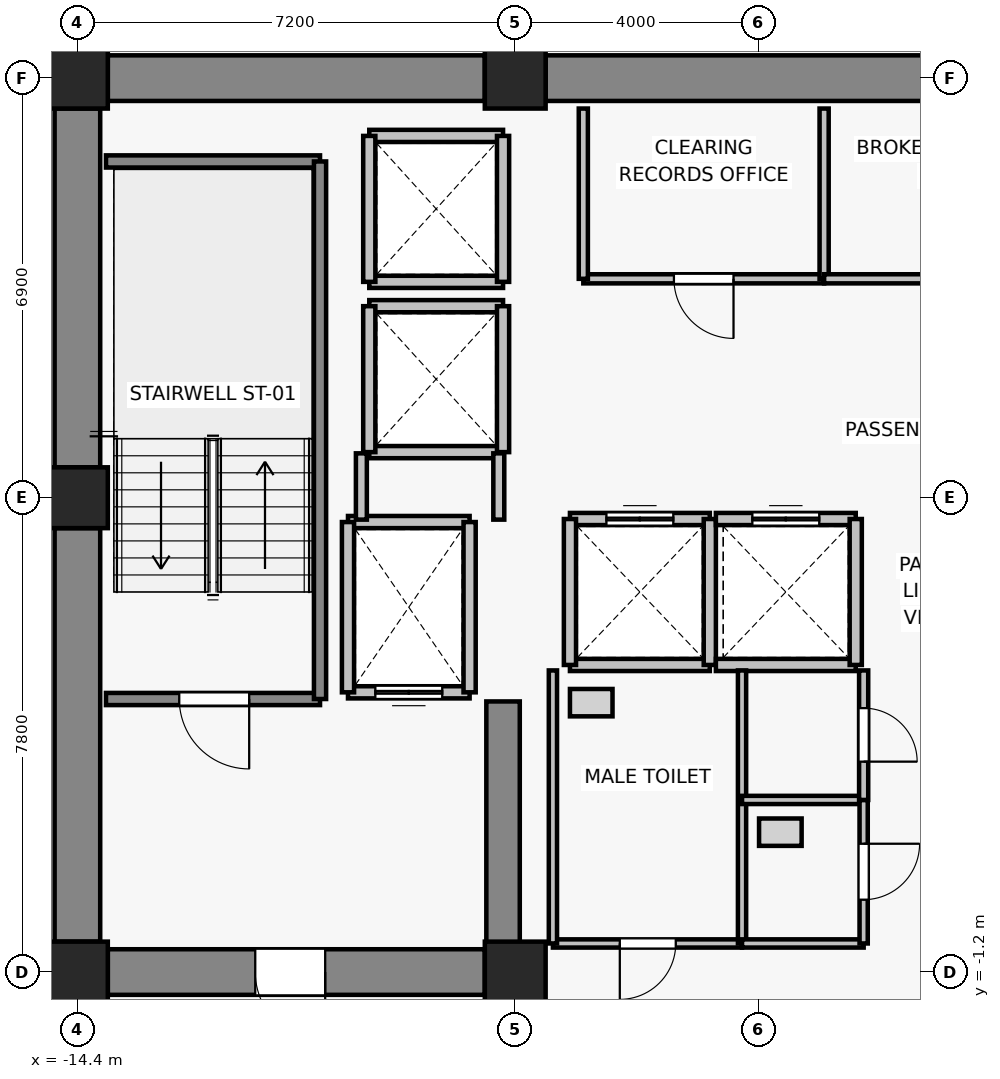
"""IFC4 building model, lengths in metres.
Left out: names, types, materials, properties, quantities, classifications, styles, units other than length and angle.
Written with IfcOpenShell. Run it as: python <this file> out.ifc"""

import sys

from ifc_helpers import new_model, si_unit, direction, frame, frame_2d, origin, origin_2d, place, context, subcontext, project, spatial, rectangle, extrude, source, transform, mapped, element, fill, save


model = new_model("IFC4")
c1 = context("Model", 3, precision=1e-05, world=origin(), true_north=direction((0.0, 1.0)))
c2 = subcontext(c1, "Body", "Model", "MODEL_VIEW")
j1 = project(units=[si_unit("LENGTHUNIT", "METRE"), si_unit("PLANEANGLEUNIT", "RADIAN")], contexts=[c1])
p1 = place(None, origin())
s1 = spatial("IfcSite", under=j1, at=p1, CompositionType="ELEMENT")
p2 = place(p1, origin())
s2 = spatial("IfcBuilding", under=s1, at=p2, CompositionType="ELEMENT")
p3 = place(p2, frame((0.0, 0.0, 116.5)))
s3 = spatial("IfcBuildingStorey", under=s2, at=p3, CompositionType="ELEMENT", Elevation=116.5)
for number, where, z_axis, x_axis in (
    (1, (-14.4, -1.2, 0.0), (0.0, 0.0, 1.0), (1.0, 0.0, 0.0)),
    (2, (-7.2, -1.2, 0.0), (0.0, 0.0, 1.0), (1.0, 0.0, 0.0)),
    (3, (-14.4, 6.6, 0.0), (0.0, 0.0, 1.0), (1.0, 0.0, 0.0)),
    (4, (-14.4, 13.5, 0.0), (0.0, 0.0, 1.0), (1.0, 0.0, 0.0)),
    (5, (-7.2, 13.5, 0.0), (0.0, 0.0, 1.0), (1.0, 0.0, 0.0)),
):
    element("IfcColumn", number, at=place(p3, frame(where, z_axis=z_axis, x_axis=x_axis)), inside=s3, PredefinedType="COLUMN", context=c2, shape_type="SweptSolid", body=[
        extrude(rectangle(XDim=1.0, YDim=1.0, at=origin_2d()), origin(), (0.0, 0.0, 1.0), 3.3),
    ])
p4 = place(p3, frame((-13.9, 13.5, 0.0), z_axis=(0.0, 0.0, 1.0), x_axis=(1.0, 0.0, 0.0)))
e6 = element("IfcWall", 6, at=p4, inside=s3, PredefinedType="SHEAR", context=c2, shape_type="SweptSolid", body=[
    extrude(rectangle(XDim=6.2, YDim=0.75, at=frame_2d((3.1, 0.0))), origin(), (0.0, 0.0, 1.0), 3.075),
])
p5 = place(p3, frame((-6.7, 13.5, 0.0), z_axis=(0.0, 0.0, 1.0), x_axis=(1.0, 0.0, 0.0)))
e7 = element("IfcWall", 7, at=p5, inside=s3, PredefinedType="SHEAR", context=c2, shape_type="SweptSolid", body=[
    extrude(rectangle(XDim=13.4, YDim=0.75, at=frame_2d((6.7, 0.0))), origin(), (0.0, 0.0, 1.0), 3.075),
])
p6 = place(p3, frame((-14.4, -0.7, 0.0), z_axis=(0.0, 0.0, 1.0), x_axis=(0.0, 1.0, 0.0)))
e8 = element("IfcWall", 8, at=p6, inside=s3, PredefinedType="SHEAR", context=c2, shape_type="SweptSolid", body=[
    extrude(rectangle(XDim=6.8, YDim=0.75, at=frame_2d((3.4, 0.0))), origin(), (0.0, 0.0, 1.0), 3.075),
])
p7 = place(p3, frame((-14.4, 7.1, 0.0), z_axis=(0.0, 0.0, 1.0), x_axis=(0.0, 1.0, 0.0)))
e9 = element("IfcWall", 9, at=p7, inside=s3, PredefinedType="SHEAR", context=c2, shape_type="SweptSolid", body=[
    extrude(rectangle(XDim=5.9, YDim=0.75, at=frame_2d((2.95, 0.0))), origin(), (0.0, 0.0, 1.0), 3.075),
])
p8 = place(p3, frame((-7.7, -1.2, 0.0), z_axis=(0.0, 0.0, 1.0), x_axis=(-1.0, 0.0, 0.0)))
e10 = element("IfcWall", 10, at=p8, inside=s3, PredefinedType="SHEAR", context=c2, shape_type="SweptSolid", body=[
    extrude(rectangle(XDim=6.2, YDim=0.75, at=frame_2d((3.1, 0.0))), origin(), (0.0, 0.0, 1.0), 3.075),
])
p9 = place(p8, frame((2.625, 0.0, 0.0)))
e11 = element("IfcOpeningElement", 11, at=p9, cuts=e10, PredefinedType="OPENING", context=c2, shape_type="SweptSolid", body=[
    extrude(rectangle(XDim=1.15, YDim=2.15, at=frame_2d((0.575, 1.075))), frame((0.0, 0.385, 0.0), z_axis=(0.0, -1.0, 0.0), x_axis=(1.0, 0.0, 0.0)), (0.0, 0.0, 1.0), 0.77),
])
p10 = place(p3, frame((-7.4, -0.825, 0.0), z_axis=(0.0, 0.0, 1.0), x_axis=(0.0, 1.0, 0.0)))
e12 = element("IfcWall", 12, at=p10, inside=s3, PredefinedType="SHEAR", context=c2, shape_type="SweptSolid", body=[
    extrude(rectangle(XDim=4.075, YDim=0.55, at=frame_2d((2.038, 0.0))), origin(), (0.0, 0.0, 1.0), 3.075),
])
p11 = place(p3, frame((-7.95, 3.4, 0.0), z_axis=(0.0, 0.0, 1.0), x_axis=(-1.0, 0.0, 0.0)))
e13 = element("IfcWall", 13, at=p11, inside=s3, PredefinedType="SOLIDWALL", context=c2, shape_type="SweptSolid", body=[
    extrude(rectangle(XDim=2.0, YDim=0.2, at=frame_2d((1.0, 0.0))), origin(), (0.0, 0.0, 1.0), 3.075),
])
p12 = place(p11, frame((0.45, 0.0, 0.0)))
e14 = element("IfcOpeningElement", 14, at=p12, cuts=e13, PredefinedType="OPENING", context=c2, shape_type="SweptSolid", body=[
    extrude(rectangle(XDim=1.1, YDim=2.2, at=frame_2d((0.55, 1.1))), frame((0.0, 0.11, 0.0), z_axis=(0.0, -1.0, 0.0), x_axis=(1.0, 0.0, 0.0)), (0.0, 0.0, 1.0), 0.22),
])
p13 = place(p3, frame((-9.95, 6.2, 0.0), z_axis=(0.0, 0.0, 1.0), x_axis=(1.0, 0.0, 0.0)))
e15 = element("IfcWall", 15, at=p13, inside=s3, PredefinedType="SOLIDWALL", context=c2, shape_type="SweptSolid", body=[
    extrude(rectangle(XDim=2.0, YDim=0.2, at=frame_2d((1.0, 0.0))), origin(), (0.0, 0.0, 1.0), 3.075),
])
for number, where, z_axis, x_axis in (
    (16, (-9.95, 3.4, 0.0), (0.0, 0.0, 1.0), (0.0, 1.0, 0.0)),
    (17, (-7.95, 6.2, 0.0), (0.0, 0.0, 1.0), (0.0, -1.0, 0.0)),
):
    element("IfcWall", number, at=place(p3, frame(where, z_axis=z_axis, x_axis=x_axis)), inside=s3, PredefinedType="SOLIDWALL", context=c2, shape_type="SweptSolid", body=[
        extrude(rectangle(XDim=2.8, YDim=0.2, at=frame_2d((1.4, 0.0))), origin(), (0.0, 0.0, 1.0), 3.075),
    ])
p14 = place(p3, frame((-4.0, 3.85, 0.0), z_axis=(0.0, 0.0, 1.0), x_axis=(-1.0, 0.0, 0.0)))
e18 = element("IfcWall", 18, at=p14, inside=s3, PredefinedType="SOLIDWALL", context=c2, shape_type="SweptSolid", body=[
    extrude(rectangle(XDim=2.3, YDim=0.2, at=frame_2d((1.15, 0.0))), origin(), (0.0, 0.0, 1.0), 3.075),
])
p15 = place(p3, frame((-6.3, 6.25, 0.0), z_axis=(0.0, 0.0, 1.0), x_axis=(1.0, 0.0, 0.0)))
e19 = element("IfcWall", 19, at=p15, inside=s3, PredefinedType="SOLIDWALL", context=c2, shape_type="SweptSolid", body=[
    extrude(rectangle(XDim=2.3, YDim=0.2, at=frame_2d((1.15, 0.0))), origin(), (0.0, 0.0, 1.0), 3.075),
])
p16 = place(p15, frame((0.6, 0.0, 0.0)))
e20 = element("IfcOpeningElement", 20, at=p16, cuts=e19, PredefinedType="OPENING", context=c2, shape_type="SweptSolid", body=[
    extrude(rectangle(XDim=1.1, YDim=2.2, at=frame_2d((0.55, 1.1))), frame((0.0, 0.11, 0.0), z_axis=(0.0, -1.0, 0.0), x_axis=(1.0, 0.0, 0.0)), (0.0, 0.0, 1.0), 0.22),
])
for number, where, z_axis, x_axis in (
    (21, (-6.3, 3.85, 0.0), (0.0, 0.0, 1.0), (0.0, 1.0, 0.0)),
    (22, (-4.0, 6.25, 0.0), (0.0, 0.0, 1.0), (0.0, -1.0, 0.0)),
):
    element("IfcWall", number, at=place(p3, frame(where, z_axis=z_axis, x_axis=x_axis)), inside=s3, PredefinedType="SOLIDWALL", context=c2, shape_type="SweptSolid", body=[
        extrude(rectangle(XDim=2.4, YDim=0.2, at=frame_2d((1.2, 0.0))), origin(), (0.0, 0.0, 1.0), 3.075),
    ])
p17 = place(p3, frame((-1.6, 3.85, 0.0), z_axis=(0.0, 0.0, 1.0), x_axis=(-1.0, 0.0, 0.0)))
e23 = element("IfcWall", 23, at=p17, inside=s3, PredefinedType="SOLIDWALL", context=c2, shape_type="SweptSolid", body=[
    extrude(rectangle(XDim=2.3, YDim=0.2, at=frame_2d((1.15, 0.0))), origin(), (0.0, 0.0, 1.0), 3.075),
])
p18 = place(p3, frame((-3.9, 6.25, 0.0), z_axis=(0.0, 0.0, 1.0), x_axis=(1.0, 0.0, 0.0)))
e24 = element("IfcWall", 24, at=p18, inside=s3, PredefinedType="SOLIDWALL", context=c2, shape_type="SweptSolid", body=[
    extrude(rectangle(XDim=2.3, YDim=0.2, at=frame_2d((1.15, 0.0))), origin(), (0.0, 0.0, 1.0), 3.075),
])
p19 = place(p18, frame((0.6, 0.0, 0.0)))
e25 = element("IfcOpeningElement", 25, at=p19, cuts=e24, PredefinedType="OPENING", context=c2, shape_type="SweptSolid", body=[
    extrude(rectangle(XDim=1.1, YDim=2.2, at=frame_2d((0.55, 1.1))), frame((0.0, 0.11, 0.0), z_axis=(0.0, -1.0, 0.0), x_axis=(1.0, 0.0, 0.0)), (0.0, 0.0, 1.0), 0.22),
])
p20 = place(p3, frame((-1.6, 6.25, 0.0), z_axis=(0.0, 0.0, 1.0), x_axis=(0.0, -1.0, 0.0)))
e26 = element("IfcWall", 26, at=p20, inside=s3, PredefinedType="SOLIDWALL", context=c2, shape_type="SweptSolid", body=[
    extrude(rectangle(XDim=2.4, YDim=0.2, at=frame_2d((1.2, 0.0))), origin(), (0.0, 0.0, 1.0), 3.075),
])
for number, where, z_axis, x_axis in (
    (27, (-7.4, 7.35, 0.0), (0.0, 0.0, 1.0), (-1.0, 0.0, 0.0)),
    (28, (-9.6, 9.75, 0.0), (0.0, 0.0, 1.0), (1.0, 0.0, 0.0)),
):
    element("IfcWall", number, at=place(p3, frame(where, z_axis=z_axis, x_axis=x_axis)), inside=s3, PredefinedType="SOLIDWALL", context=c2, shape_type="SweptSolid", body=[
        extrude(rectangle(XDim=2.2, YDim=0.2, at=frame_2d((1.1, 0.0))), origin(), (0.0, 0.0, 1.0), 2.515),
    ])
p21 = place(p3, frame((-9.6, 7.35, 0.0), z_axis=(0.0, 0.0, 1.0), x_axis=(0.0, 1.0, 0.0)))
e29 = element("IfcWall", 29, at=p21, inside=s3, PredefinedType="SOLIDWALL", context=c2, shape_type="SweptSolid", body=[
    extrude(rectangle(XDim=2.4, YDim=0.2, at=frame_2d((1.2, 0.0))), origin(), (0.0, 0.0, 1.0), 3.075),
])
p22 = place(p3, frame((-7.4, 9.75, 0.0), z_axis=(0.0, 0.0, 1.0), x_axis=(0.0, -1.0, 0.0)))
e30 = element("IfcWall", 30, at=p22, inside=s3, PredefinedType="SOLIDWALL", context=c2, shape_type="SweptSolid", body=[
    extrude(rectangle(XDim=2.4, YDim=0.2, at=frame_2d((1.2, 0.0))), origin(), (0.0, 0.0, 1.0), 2.515),
])
for number, where, z_axis, x_axis in (
    (31, (-7.4, 10.15, 0.0), (0.0, 0.0, 1.0), (-1.0, 0.0, 0.0)),
    (32, (-9.6, 12.55, 0.0), (0.0, 0.0, 1.0), (1.0, 0.0, 0.0)),
):
    element("IfcWall", number, at=place(p3, frame(where, z_axis=z_axis, x_axis=x_axis)), inside=s3, PredefinedType="SOLIDWALL", context=c2, shape_type="SweptSolid", body=[
        extrude(rectangle(XDim=2.2, YDim=0.2, at=frame_2d((1.1, 0.0))), origin(), (0.0, 0.0, 1.0), 2.515),
    ])
p23 = place(p3, frame((-9.6, 10.15, 0.0), z_axis=(0.0, 0.0, 1.0), x_axis=(0.0, 1.0, 0.0)))
e33 = element("IfcWall", 33, at=p23, inside=s3, PredefinedType="SOLIDWALL", context=c2, shape_type="SweptSolid", body=[
    extrude(rectangle(XDim=2.4, YDim=0.2, at=frame_2d((1.2, 0.0))), origin(), (0.0, 0.0, 1.0), 3.075),
])
p24 = place(p3, frame((-7.4, 12.55, 0.0), z_axis=(0.0, 0.0, 1.0), x_axis=(0.0, -1.0, 0.0)))
e34 = element("IfcWall", 34, at=p24, inside=s3, PredefinedType="SOLIDWALL", context=c2, shape_type="SweptSolid", body=[
    extrude(rectangle(XDim=2.4, YDim=0.2, at=frame_2d((1.2, 0.0))), origin(), (0.0, 0.0, 1.0), 2.515),
])
p25 = place(p3, frame((-10.41, 3.29, 0.0), z_axis=(0.0, 0.0, 1.0), x_axis=(-1.0, 0.0, 0.0)))
e35 = element("IfcWall", 35, at=p25, inside=s3, PredefinedType="SOLIDWALL", context=c2, shape_type="SweptSolid", body=[
    extrude(rectangle(XDim=3.52, YDim=0.2, at=frame_2d((1.76, 0.0))), origin(), (0.0, 0.0, 1.0), 3.075),
])
p26 = place(p25, frame((1.165, 0.0, 0.0)))
e36 = element("IfcOpeningElement", 36, at=p26, cuts=e35, PredefinedType="OPENING", context=c2, shape_type="SweptSolid", body=[
    extrude(rectangle(XDim=1.15, YDim=2.15, at=frame_2d((0.575, 1.075))), frame((0.0, 0.11, 0.0), z_axis=(0.0, -1.0, 0.0), x_axis=(1.0, 0.0, 0.0)), (0.0, 0.0, 1.0), 0.22),
])
p27 = place(p3, frame((-13.93, 12.13, 0.0), z_axis=(0.0, 0.0, 1.0), x_axis=(1.0, 0.0, 0.0)))
e37 = element("IfcWall", 37, at=p27, inside=s3, PredefinedType="SOLIDWALL", context=c2, shape_type="SweptSolid", body=[
    extrude(rectangle(XDim=3.52, YDim=0.2, at=frame_2d((1.76, 0.0))), origin(), (0.0, 0.0, 1.0), 3.075),
])
p28 = place(p3, frame((-10.41, 12.13, 0.0), z_axis=(0.0, 0.0, 1.0), x_axis=(0.0, -1.0, 0.0)))
e38 = element("IfcWall", 38, at=p28, inside=s3, PredefinedType="SOLIDWALL", context=c2, shape_type="SweptSolid", body=[
    extrude(rectangle(XDim=8.84, YDim=0.2, at=frame_2d((4.42, 0.0))), origin(), (0.0, 0.0, 1.0), 3.075),
])
p29 = place(p3, frame((-9.73, 6.24, 0.0), z_axis=(0.0, 0.0, 1.0), x_axis=(0.0, 1.0, 0.0)))
e39 = element("IfcWall", 39, at=p29, inside=s3, PredefinedType="PARTITIONING", context=c2, shape_type="SweptSolid", body=[
    extrude(rectangle(XDim=1.09, YDim=0.18, at=frame_2d((0.545, 0.0))), origin(), (0.0, 0.0, 1.0), 3.075),
])
p30 = place(p3, frame((-7.47, 7.33, 0.0), z_axis=(0.0, 0.0, 1.0), x_axis=(0.0, -1.0, 0.0)))
e40 = element("IfcWall", 40, at=p30, inside=s3, PredefinedType="PARTITIONING", context=c2, shape_type="SweptSolid", body=[
    extrude(rectangle(XDim=1.09, YDim=0.18, at=frame_2d((0.545, 0.0))), origin(), (0.0, 0.0, 1.0), 2.515),
])
p31 = place(p3, frame((-2.12, 10.2, 0.0), z_axis=(0.0, 0.0, 1.0), x_axis=(-1.0, 0.0, 0.0)))
e41 = element("IfcWall", 41, at=p31, inside=s3, PredefinedType="PARTITIONING", context=c2, shape_type="SweptSolid", body=[
    extrude(rectangle(XDim=3.96, YDim=0.15, at=frame_2d((1.98, 0.0))), origin(), (0.0, 0.0, 1.0), 3.075),
])
p32 = place(p31, frame((1.49, 0.0, 0.0)))
e42 = element("IfcOpeningElement", 42, at=p32, cuts=e41, PredefinedType="OPENING", context=c2, shape_type="SweptSolid", body=[
    extrude(rectangle(XDim=0.98, YDim=2.15, at=frame_2d((0.49, 1.075))), frame((0.0, 0.085, 0.0), z_axis=(0.0, -1.0, 0.0), x_axis=(1.0, 0.0, 0.0)), (0.0, 0.0, 1.0), 0.17),
])
for number, where, z_axis, x_axis in (
    (43, (-6.08, 10.2, 0.0), (0.0, 0.0, 1.0), (0.0, 1.0, 0.0)),
    (44, (-2.12, 13.0, 0.0), (0.0, 0.0, 1.0), (0.0, -1.0, 0.0)),
):
    element("IfcWall", number, at=place(p3, frame(where, z_axis=z_axis, x_axis=x_axis)), inside=s3, PredefinedType="PARTITIONING", context=c2, shape_type="SweptSolid", body=[
        extrude(rectangle(XDim=2.8, YDim=0.15, at=frame_2d((1.4, 0.0))), origin(), (0.0, 0.0, 1.0), 3.075),
    ])
p33 = place(p3, frame((2.04, 10.2, 0.0), z_axis=(0.0, 0.0, 1.0), x_axis=(-1.0, 0.0, 0.0)))
e45 = element("IfcWall", 45, at=p33, inside=s3, PredefinedType="PARTITIONING", context=c2, shape_type="SweptSolid", body=[
    extrude(rectangle(XDim=4.16, YDim=0.15, at=frame_2d((2.08, 0.0))), origin(), (0.0, 0.0, 1.0), 3.075),
])
p34 = place(p33, frame((1.55, 0.0, 0.0)))
e46 = element("IfcOpeningElement", 46, at=p34, cuts=e45, PredefinedType="OPENING", context=c2, shape_type="SweptSolid", body=[
    extrude(rectangle(XDim=0.98, YDim=2.15, at=frame_2d((0.49, 1.075))), frame((0.0, 0.085, 0.0), z_axis=(0.0, -1.0, 0.0), x_axis=(1.0, 0.0, 0.0)), (0.0, 0.0, 1.0), 0.17),
])
p35 = place(p3, frame((-3.47, -0.73, 0.0), z_axis=(0.0, 0.0, 1.0), x_axis=(-1.0, 0.0, 0.0)))
e47 = element("IfcWall", 47, at=p35, inside=s3, PredefinedType="PARTITIONING", context=c2, shape_type="SweptSolid", body=[
    extrude(rectangle(XDim=3.11, YDim=0.135, at=frame_2d((1.555, 0.0))), origin(), (0.0, 0.0, 1.0), 3.075),
])
p36 = place(p35, frame((1.09, 0.0, 0.0)))
e48 = element("IfcOpeningElement", 48, at=p36, cuts=e47, PredefinedType="OPENING", context=c2, shape_type="SweptSolid", body=[
    extrude(rectangle(XDim=0.92, YDim=2.1, at=frame_2d((0.46, 1.05))), frame((0.0, 0.077, 0.0), z_axis=(0.0, -1.0, 0.0), x_axis=(1.0, 0.0, 0.0)), (0.0, 0.0, 1.0), 0.155),
])
for number, where, z_axis, x_axis in (
    (49, (-6.58, -0.73, 0.0), (0.0, 0.0, 1.0), (0.0, 1.0, 0.0)),
    (50, (-3.47, 3.76, 0.0), (0.0, 0.0, 1.0), (0.0, -1.0, 0.0)),
):
    element("IfcWall", number, at=place(p3, frame(where, z_axis=z_axis, x_axis=x_axis)), inside=s3, PredefinedType="PARTITIONING", context=c2, shape_type="SweptSolid", body=[
        extrude(rectangle(XDim=4.49, YDim=0.135, at=frame_2d((2.245, 0.0))), origin(), (0.0, 0.0, 1.0), 3.075),
    ])
for number, where, z_axis, x_axis in (
    (51, (-1.47, -0.73, 0.0), (0.0, 0.0, 1.0), (-1.0, 0.0, 0.0)),
    (52, (-3.47, 1.63, 0.0), (0.0, 0.0, 1.0), (1.0, 0.0, 0.0)),
):
    element("IfcWall", number, at=place(p3, frame(where, z_axis=z_axis, x_axis=x_axis)), inside=s3, PredefinedType="PARTITIONING", context=c2, shape_type="SweptSolid", body=[
        extrude(rectangle(XDim=2.0, YDim=0.135, at=frame_2d((1.0, 0.0))), origin(), (0.0, 0.0, 1.0), 3.075),
    ])
p37 = place(p3, frame((-1.47, 1.63, 0.0), z_axis=(0.0, 0.0, 1.0), x_axis=(0.0, -1.0, 0.0)))
e53 = element("IfcWall", 53, at=p37, inside=s3, PredefinedType="PARTITIONING", context=c2, shape_type="SweptSolid", body=[
    extrude(rectangle(XDim=2.36, YDim=0.135, at=frame_2d((1.18, 0.0))), origin(), (0.0, 0.0, 1.0), 3.075),
])
p38 = place(p37, frame((0.72, 0.0, 0.0)))
e54 = element("IfcOpeningElement", 54, at=p38, cuts=e53, PredefinedType="OPENING", context=c2, shape_type="SweptSolid", body=[
    extrude(rectangle(XDim=0.92, YDim=2.1, at=frame_2d((0.46, 1.05))), frame((0.0, 0.077, 0.0), z_axis=(0.0, -1.0, 0.0), x_axis=(1.0, 0.0, 0.0)), (0.0, 0.0, 1.0), 0.155),
])
p39 = place(p3, frame((-1.47, 3.76, 0.0), z_axis=(0.0, 0.0, 1.0), x_axis=(0.0, -1.0, 0.0)))
e55 = element("IfcWall", 55, at=p39, inside=s3, PredefinedType="PARTITIONING", context=c2, shape_type="SweptSolid", body=[
    extrude(rectangle(XDim=2.13, YDim=0.15, at=frame_2d((1.065, 0.0))), origin(), (0.0, 0.0, 1.0), 3.075),
])
p40 = place(p39, frame((0.62, 0.0, 0.0)))
e56 = element("IfcOpeningElement", 56, at=p40, cuts=e55, PredefinedType="OPENING", context=c2, shape_type="SweptSolid", body=[
    extrude(rectangle(XDim=0.88, YDim=2.1, at=frame_2d((0.44, 1.05))), frame((0.0, 0.085, 0.0), z_axis=(0.0, -1.0, 0.0), x_axis=(1.0, 0.0, 0.0)), (0.0, 0.0, 1.0), 0.17),
])
m1 = source(origin(), c2, "Body", "SweptSolid", [
    extrude(rectangle(XDim=1.1, YDim=2.2, at=frame_2d((0.55, 1.1))), frame((0.0, 0.025, 0.0), z_axis=(0.0, -1.0, 0.0), x_axis=(1.0, 0.0, 0.0)), (0.0, 0.0, 1.0), 0.05),
])
p41 = place(p12, origin())
e57 = element("IfcDoor", 57, at=p41, inside=s3, OperationType="DOUBLE_DOOR_SLIDING", PredefinedType="DOOR", context=c2, shape_type="MappedRepresentation", body=[
    mapped(m1, transform((0.0, 0.0, 0.0), x_axis=(1.0, 0.0, 0.0), y_axis=(0.0, 1.0, 0.0), z_axis=(0.0, 0.0, 1.0), scale=1.0)),
])
fill(e14, e57)
p42 = place(p16, origin())
e58 = element("IfcDoor", 58, at=p42, inside=s3, OperationType="DOUBLE_DOOR_SLIDING", PredefinedType="DOOR", context=c2, shape_type="MappedRepresentation", body=[
    mapped(m1, transform((0.0, 0.0, 0.0), x_axis=(1.0, 0.0, 0.0), y_axis=(0.0, 1.0, 0.0), z_axis=(0.0, 0.0, 1.0), scale=1.0)),
])
fill(e20, e58)
p43 = place(p19, origin())
e59 = element("IfcDoor", 59, at=p43, inside=s3, OperationType="DOUBLE_DOOR_SLIDING", PredefinedType="DOOR", context=c2, shape_type="MappedRepresentation", body=[
    mapped(m1, transform((0.0, 0.0, 0.0), x_axis=(1.0, 0.0, 0.0), y_axis=(0.0, 1.0, 0.0), z_axis=(0.0, 0.0, 1.0), scale=1.0)),
])
fill(e25, e59)
m2 = source(origin(), c2, "Body", "SweptSolid", [
    extrude(rectangle(XDim=1.15, YDim=2.15, at=frame_2d((0.575, 1.075))), frame((0.0, 0.025, 0.0), z_axis=(0.0, -1.0, 0.0), x_axis=(1.0, 0.0, 0.0)), (0.0, 0.0, 1.0), 0.05),
])
p44 = place(p26, origin())
e60 = element("IfcDoor", 60, at=p44, inside=s3, OperationType="SINGLE_SWING_LEFT", PredefinedType="DOOR", context=c2, shape_type="MappedRepresentation", body=[
    mapped(m2, transform((0.0, 0.0, 0.0), x_axis=(1.0, 0.0, 0.0), y_axis=(0.0, 1.0, 0.0), z_axis=(0.0, 0.0, 1.0), scale=1.0)),
])
fill(e36, e60)
p45 = place(p9, origin())
e61 = element("IfcDoor", 61, at=p45, inside=s3, OperationType="SINGLE_SWING_LEFT", PredefinedType="DOOR", context=c2, shape_type="MappedRepresentation", body=[
    mapped(m2, transform((0.0, 0.0, 0.0), x_axis=(1.0, 0.0, 0.0), y_axis=(0.0, 1.0, 0.0), z_axis=(0.0, 0.0, 1.0), scale=1.0)),
])
fill(e11, e61)
m3 = source(origin(), c2, "Body", "SweptSolid", [
    extrude(rectangle(XDim=0.98, YDim=2.15, at=frame_2d((0.49, 1.075))), frame((0.0, 0.025, 0.0), z_axis=(0.0, -1.0, 0.0), x_axis=(1.0, 0.0, 0.0)), (0.0, 0.0, 1.0), 0.05),
])
p46 = place(p32, origin())
e62 = element("IfcDoor", 62, at=p46, inside=s3, OperationType="SINGLE_SWING_LEFT", PredefinedType="DOOR", context=c2, shape_type="MappedRepresentation", body=[
    mapped(m3, transform((0.0, 0.0, 0.0), x_axis=(1.0, 0.0, 0.0), y_axis=(0.0, 1.0, 0.0), z_axis=(0.0, 0.0, 1.0), scale=1.0)),
])
fill(e42, e62)
m4 = source(origin(), c2, "Body", "SweptSolid", [
    extrude(rectangle(XDim=0.92, YDim=2.1, at=frame_2d((0.46, 1.05))), frame((0.0, 0.025, 0.0), z_axis=(0.0, -1.0, 0.0), x_axis=(1.0, 0.0, 0.0)), (0.0, 0.0, 1.0), 0.05),
])
p47 = place(p36, origin())
e63 = element("IfcDoor", 63, at=p47, inside=s3, OperationType="SINGLE_SWING_RIGHT", PredefinedType="DOOR", context=c2, shape_type="MappedRepresentation", body=[
    mapped(m4, transform((0.0, 0.0, 0.0), x_axis=(1.0, 0.0, 0.0), y_axis=(0.0, 1.0, 0.0), z_axis=(0.0, 0.0, 1.0), scale=1.0)),
])
fill(e48, e63)
p48 = place(p38, origin())
e64 = element("IfcDoor", 64, at=p48, inside=s3, OperationType="SINGLE_SWING_LEFT", PredefinedType="DOOR", context=c2, shape_type="MappedRepresentation", body=[
    mapped(m4, transform((0.0, 0.0, 0.0), x_axis=(1.0, 0.0, 0.0), y_axis=(0.0, 1.0, 0.0), z_axis=(0.0, 0.0, 1.0), scale=1.0)),
])
fill(e54, e64)
m5 = source(origin(), c2, "Body", "SweptSolid", [
    extrude(rectangle(XDim=0.88, YDim=2.1, at=frame_2d((0.44, 1.05))), frame((0.0, 0.025, 0.0), z_axis=(0.0, -1.0, 0.0), x_axis=(1.0, 0.0, 0.0)), (0.0, 0.0, 1.0), 0.05),
])
p49 = place(p40, origin())
e65 = element("IfcDoor", 65, at=p49, inside=s3, OperationType="SINGLE_SWING_RIGHT", PredefinedType="DOOR", context=c2, shape_type="MappedRepresentation", body=[
    mapped(m5, transform((0.0, 0.0, 0.0), x_axis=(1.0, 0.0, 0.0), y_axis=(0.0, 1.0, 0.0), z_axis=(0.0, 0.0, 1.0), scale=1.0)),
])
fill(e56, e65)
save(model, sys.argv[1])
